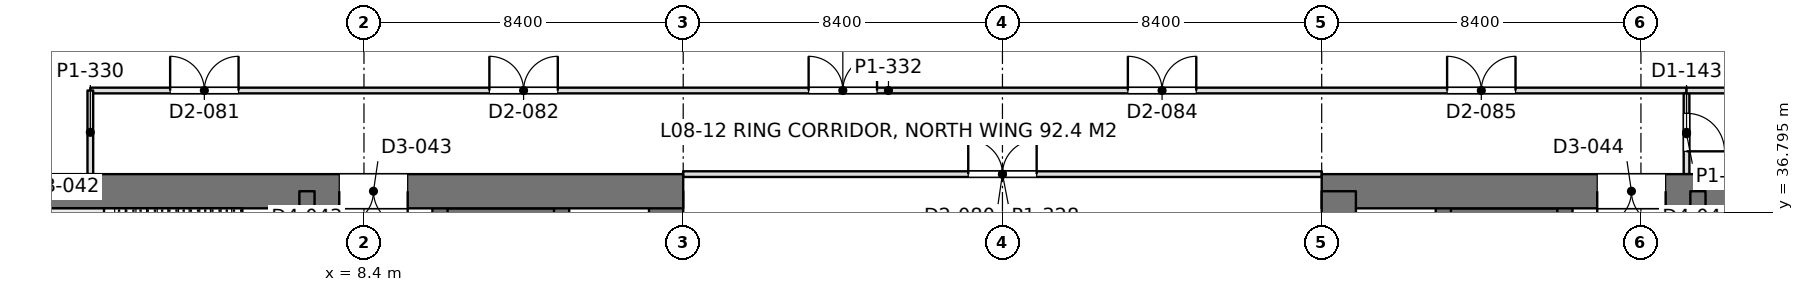
"""IFC4 building model, lengths in metres.
Left out: names, types, materials, properties, quantities, classifications, styles, units other than length and angle.
Written with IfcOpenShell. Run it as: python <this file> out.ifc"""

import sys

from ifc_helpers import new_model, si_unit, direction, frame, frame_2d, origin, place, context, subcontext, project, spatial, rectangle, extrude, element, fill, save


model = new_model("IFC4")
c1 = context("Model", 3, precision=1e-05, world=origin(), true_north=direction((0.0, 1.0)))
c2 = subcontext(c1, "Body", "Model", "MODEL_VIEW")
j1 = project(units=[si_unit("LENGTHUNIT", "METRE"), si_unit("PLANEANGLEUNIT", "RADIAN")], contexts=[c1])
p1 = place(None, origin())
s1 = spatial("IfcSite", under=j1, at=p1, CompositionType="ELEMENT")
p2 = place(p1, origin())
s2 = spatial("IfcBuilding", under=s1, at=p2, CompositionType="ELEMENT")
p3 = place(p2, frame((0.0, 0.0, 36.9)))
s3 = spatial("IfcBuildingStorey", under=s2, at=p3, CompositionType="ELEMENT", Elevation=36.9)
p4 = place(p3, frame((-1.2, 37.35, 0.0), z_axis=(0.0, 0.0, 1.0), x_axis=(1.0, 0.0, 0.0)))
e1 = element("IfcWall", 1, at=p4, inside=s3, PredefinedType="SHEAR", context=c2, shape_type="SweptSolid", body=[
    extrude(rectangle(XDim=18.0, YDim=0.9, at=frame_2d((9.0, 0.0))), origin(), (0.0, 0.0, 1.0), 4.5),
])
p5 = place(p4, frame((8.95, 0.0, 0.0)))
e2 = element("IfcOpeningElement", 2, at=p5, cuts=e1, PredefinedType="OPENING", context=c2, shape_type="SweptSolid", body=[
    extrude(rectangle(XDim=1.8, YDim=2.4, at=frame_2d((0.9, 1.2))), frame((0.0, 0.46, 0.0), z_axis=(0.0, -1.0, 0.0), x_axis=(1.0, 0.0, 0.0)), (0.0, 0.0, 1.0), 0.92),
])
p6 = place(p3, frame((16.35, 13.05, 0.0), z_axis=(0.0, 0.0, 1.0), x_axis=(0.0, 1.0, 0.0)))
e3 = element("IfcWall", 3, at=p6, inside=s3, PredefinedType="SHEAR", context=c2, shape_type="SweptSolid", body=[
    extrude(rectangle(XDim=24.3, YDim=0.9, at=frame_2d((12.15, 0.0))), origin(), (0.0, 0.0, 1.0), 4.5),
])
p7 = place(p3, frame((6.9, 13.05, 0.0), z_axis=(0.0, 0.0, 1.0), x_axis=(0.0, 1.0, 0.0)))
e4 = element("IfcWall", 4, at=p7, inside=s3, PredefinedType="SHEAR", context=c2, shape_type="SweptSolid", body=[
    extrude(rectangle(XDim=24.3, YDim=0.4, at=frame_2d((12.15, 0.0))), origin(), (0.0, 0.0, 1.0), 4.5),
])
p8 = place(p7, frame((1.3, 0.0, 0.0)))
e5 = element("IfcOpeningElement", 5, at=p8, cuts=e4, PredefinedType="OPENING", context=c2, shape_type="SweptSolid", body=[
    extrude(rectangle(XDim=1.0, YDim=2.2, at=frame_2d((0.5, 1.1))), frame((0.0, 0.21, 0.0), z_axis=(0.0, -1.0, 0.0), x_axis=(1.0, 0.0, 0.0)), (0.0, 0.0, 1.0), 0.42),
])
p9 = place(p7, frame((22.0, 0.0, 0.0)))
e6 = element("IfcOpeningElement", 6, at=p9, cuts=e4, PredefinedType="OPENING", context=c2, shape_type="SweptSolid", body=[
    extrude(rectangle(XDim=1.0, YDim=2.2, at=frame_2d((0.5, 1.1))), frame((0.0, 0.21, 0.0), z_axis=(0.0, -1.0, 0.0), x_axis=(1.0, 0.0, 0.0)), (0.0, 0.0, 1.0), 0.42),
])
p10 = place(p7, frame((5.55, 0.0, 0.0)))
e7 = element("IfcOpeningElement", 7, at=p10, cuts=e4, PredefinedType="OPENING", context=c2, shape_type="SweptSolid", body=[
    extrude(rectangle(XDim=1.0, YDim=2.2, at=frame_2d((0.5, 1.1))), frame((0.0, 0.21, 0.0), z_axis=(0.0, -1.0, 0.0), x_axis=(1.0, 0.0, 0.0)), (0.0, 0.0, 1.0), 0.42),
])
p11 = place(p7, frame((9.55, 0.0, 0.0)))
e8 = element("IfcOpeningElement", 8, at=p11, cuts=e4, PredefinedType="OPENING", context=c2, shape_type="SweptSolid", body=[
    extrude(rectangle(XDim=1.0, YDim=2.2, at=frame_2d((0.5, 1.1))), frame((0.0, 0.21, 0.0), z_axis=(0.0, -1.0, 0.0), x_axis=(1.0, 0.0, 0.0)), (0.0, 0.0, 1.0), 0.42),
])
p12 = place(p7, frame((12.8, 0.0, 0.0)))
e9 = element("IfcOpeningElement", 9, at=p12, cuts=e4, PredefinedType="OPENING", context=c2, shape_type="SweptSolid", body=[
    extrude(rectangle(XDim=1.1, YDim=2.2, at=frame_2d((0.55, 1.1))), frame((0.0, 0.21, 0.0), z_axis=(0.0, -1.0, 0.0), x_axis=(1.0, 0.0, 0.0)), (0.0, 0.0, 1.0), 0.42),
])
p13 = place(p7, frame((15.538, 0.0, 0.0)))
e10 = element("IfcOpeningElement", 10, at=p13, cuts=e4, PredefinedType="OPENING", context=c2, shape_type="SweptSolid", body=[
    extrude(rectangle(XDim=1.1, YDim=2.2, at=frame_2d((0.55, 1.1))), frame((0.0, 0.21, 0.0), z_axis=(0.0, -1.0, 0.0), x_axis=(1.0, 0.0, 0.0)), (0.0, 0.0, 1.0), 0.42),
])
p14 = place(p7, frame((18.262, 0.0, 0.0)))
e11 = element("IfcOpeningElement", 11, at=p14, cuts=e4, PredefinedType="OPENING", context=c2, shape_type="SweptSolid", body=[
    extrude(rectangle(XDim=1.1, YDim=2.2, at=frame_2d((0.55, 1.1))), frame((0.0, 0.21, 0.0), z_axis=(0.0, -1.0, 0.0), x_axis=(1.0, 0.0, 0.0)), (0.0, 0.0, 1.0), 0.42),
])
p15 = place(p3, frame((10.4, 13.05, 0.0), z_axis=(0.0, 0.0, 1.0), x_axis=(0.0, 1.0, 0.0)))
e12 = element("IfcWall", 12, at=p15, inside=s3, PredefinedType="SHEAR", context=c2, shape_type="SweptSolid", body=[
    extrude(rectangle(XDim=24.3, YDim=0.4, at=frame_2d((12.15, 0.0))), origin(), (0.0, 0.0, 1.0), 4.5),
])
p16 = place(p15, frame((1.5, 0.0, 0.0)))
e13 = element("IfcOpeningElement", 13, at=p16, cuts=e12, PredefinedType="OPENING", context=c2, shape_type="SweptSolid", body=[
    extrude(rectangle(XDim=1.1, YDim=2.2, at=frame_2d((0.55, 1.1))), frame((0.0, 0.21, 0.0), z_axis=(0.0, -1.0, 0.0), x_axis=(1.0, 0.0, 0.0)), (0.0, 0.0, 1.0), 0.42),
])
p17 = place(p15, frame((4.35, 0.0, 0.0)))
e14 = element("IfcOpeningElement", 14, at=p17, cuts=e12, PredefinedType="OPENING", context=c2, shape_type="SweptSolid", body=[
    extrude(rectangle(XDim=1.1, YDim=2.2, at=frame_2d((0.55, 1.1))), frame((0.0, 0.21, 0.0), z_axis=(0.0, -1.0, 0.0), x_axis=(1.0, 0.0, 0.0)), (0.0, 0.0, 1.0), 0.42),
])
p18 = place(p15, frame((7.2, 0.0, 0.0)))
e15 = element("IfcOpeningElement", 15, at=p18, cuts=e12, PredefinedType="OPENING", context=c2, shape_type="SweptSolid", body=[
    extrude(rectangle(XDim=1.1, YDim=2.2, at=frame_2d((0.55, 1.1))), frame((0.0, 0.21, 0.0), z_axis=(0.0, -1.0, 0.0), x_axis=(1.0, 0.0, 0.0)), (0.0, 0.0, 1.0), 0.42),
])
p19 = place(p15, frame((21.45, 0.0, 0.0)))
e16 = element("IfcOpeningElement", 16, at=p19, cuts=e12, PredefinedType="OPENING", context=c2, shape_type="SweptSolid", body=[
    extrude(rectangle(XDim=1.1, YDim=2.2, at=frame_2d((0.55, 1.1))), frame((0.0, 0.21, 0.0), z_axis=(0.0, -1.0, 0.0), x_axis=(1.0, 0.0, 0.0)), (0.0, 0.0, 1.0), 0.42),
])
p20 = place(p3, frame((13.6, 13.05, 0.0), z_axis=(0.0, 0.0, 1.0), x_axis=(0.0, 1.0, 0.0)))
e17 = element("IfcWall", 17, at=p20, inside=s3, PredefinedType="SHEAR", context=c2, shape_type="SweptSolid", body=[
    extrude(rectangle(XDim=24.3, YDim=0.4, at=frame_2d((12.15, 0.0))), origin(), (0.0, 0.0, 1.0), 4.5),
])
p21 = place(p3, frame((10.4, 36.625, 0.0), z_axis=(0.0, 0.0, 1.0), x_axis=(1.0, 0.0, 0.0)))
e18 = element("IfcWall", 18, at=p21, inside=s3, PredefinedType="SHEAR", context=c2, shape_type="SweptSolid", body=[
    extrude(rectangle(XDim=3.2, YDim=0.55, at=frame_2d((1.6, 0.0))), origin(), (0.0, 0.0, 1.0), 4.5),
])
p22 = place(p3, frame((33.6, 37.35, 0.0), z_axis=(0.0, 0.0, 1.0), x_axis=(1.0, 0.0, 0.0)))
e19 = element("IfcWall", 19, at=p22, inside=s3, PredefinedType="SHEAR", context=c2, shape_type="SweptSolid", body=[
    extrude(rectangle(XDim=18.0, YDim=0.9, at=frame_2d((9.0, 0.0))), origin(), (0.0, 0.0, 1.0), 4.5),
])
p23 = place(p22, frame((7.25, 0.0, 0.0)))
e20 = element("IfcOpeningElement", 20, at=p23, cuts=e19, PredefinedType="OPENING", context=c2, shape_type="SweptSolid", body=[
    extrude(rectangle(XDim=1.8, YDim=2.4, at=frame_2d((0.9, 1.2))), frame((0.0, 0.46, 0.0), z_axis=(0.0, -1.0, 0.0), x_axis=(1.0, 0.0, 0.0)), (0.0, 0.0, 1.0), 0.92),
])
p24 = place(p3, frame((34.05, 13.05, 0.0), z_axis=(0.0, 0.0, 1.0), x_axis=(0.0, 1.0, 0.0)))
e21 = element("IfcWall", 21, at=p24, inside=s3, PredefinedType="SHEAR", context=c2, shape_type="SweptSolid", body=[
    extrude(rectangle(XDim=24.3, YDim=0.9, at=frame_2d((12.15, 0.0))), origin(), (0.0, 0.0, 1.0), 4.5),
])
p25 = place(p3, frame((43.5, 13.05, 0.0), z_axis=(0.0, 0.0, 1.0), x_axis=(0.0, 1.0, 0.0)))
e22 = element("IfcWall", 22, at=p25, inside=s3, PredefinedType="SHEAR", context=c2, shape_type="SweptSolid", body=[
    extrude(rectangle(XDim=24.3, YDim=0.4, at=frame_2d((12.15, 0.0))), origin(), (0.0, 0.0, 1.0), 4.5),
])
p26 = place(p25, frame((1.3, 0.0, 0.0)))
e23 = element("IfcOpeningElement", 23, at=p26, cuts=e22, PredefinedType="OPENING", context=c2, shape_type="SweptSolid", body=[
    extrude(rectangle(XDim=1.0, YDim=2.2, at=frame_2d((0.5, 1.1))), frame((0.0, 0.21, 0.0), z_axis=(0.0, -1.0, 0.0), x_axis=(1.0, 0.0, 0.0)), (0.0, 0.0, 1.0), 0.42),
])
p27 = place(p25, frame((22.0, 0.0, 0.0)))
e24 = element("IfcOpeningElement", 24, at=p27, cuts=e22, PredefinedType="OPENING", context=c2, shape_type="SweptSolid", body=[
    extrude(rectangle(XDim=1.0, YDim=2.2, at=frame_2d((0.5, 1.1))), frame((0.0, 0.21, 0.0), z_axis=(0.0, -1.0, 0.0), x_axis=(1.0, 0.0, 0.0)), (0.0, 0.0, 1.0), 0.42),
])
p28 = place(p25, frame((5.55, 0.0, 0.0)))
e25 = element("IfcOpeningElement", 25, at=p28, cuts=e22, PredefinedType="OPENING", context=c2, shape_type="SweptSolid", body=[
    extrude(rectangle(XDim=1.0, YDim=2.2, at=frame_2d((0.5, 1.1))), frame((0.0, 0.21, 0.0), z_axis=(0.0, -1.0, 0.0), x_axis=(1.0, 0.0, 0.0)), (0.0, 0.0, 1.0), 0.42),
])
p29 = place(p25, frame((9.55, 0.0, 0.0)))
e26 = element("IfcOpeningElement", 26, at=p29, cuts=e22, PredefinedType="OPENING", context=c2, shape_type="SweptSolid", body=[
    extrude(rectangle(XDim=1.0, YDim=2.2, at=frame_2d((0.5, 1.1))), frame((0.0, 0.21, 0.0), z_axis=(0.0, -1.0, 0.0), x_axis=(1.0, 0.0, 0.0)), (0.0, 0.0, 1.0), 0.42),
])
p30 = place(p25, frame((12.8, 0.0, 0.0)))
e27 = element("IfcOpeningElement", 27, at=p30, cuts=e22, PredefinedType="OPENING", context=c2, shape_type="SweptSolid", body=[
    extrude(rectangle(XDim=1.1, YDim=2.2, at=frame_2d((0.55, 1.1))), frame((0.0, 0.21, 0.0), z_axis=(0.0, -1.0, 0.0), x_axis=(1.0, 0.0, 0.0)), (0.0, 0.0, 1.0), 0.42),
])
p31 = place(p25, frame((15.538, 0.0, 0.0)))
e28 = element("IfcOpeningElement", 28, at=p31, cuts=e22, PredefinedType="OPENING", context=c2, shape_type="SweptSolid", body=[
    extrude(rectangle(XDim=1.1, YDim=2.2, at=frame_2d((0.55, 1.1))), frame((0.0, 0.21, 0.0), z_axis=(0.0, -1.0, 0.0), x_axis=(1.0, 0.0, 0.0)), (0.0, 0.0, 1.0), 0.42),
])
p32 = place(p25, frame((18.262, 0.0, 0.0)))
e29 = element("IfcOpeningElement", 29, at=p32, cuts=e22, PredefinedType="OPENING", context=c2, shape_type="SweptSolid", body=[
    extrude(rectangle(XDim=1.1, YDim=2.2, at=frame_2d((0.55, 1.1))), frame((0.0, 0.21, 0.0), z_axis=(0.0, -1.0, 0.0), x_axis=(1.0, 0.0, 0.0)), (0.0, 0.0, 1.0), 0.42),
])
p33 = place(p3, frame((40.0, 13.05, 0.0), z_axis=(0.0, 0.0, 1.0), x_axis=(0.0, 1.0, 0.0)))
e30 = element("IfcWall", 30, at=p33, inside=s3, PredefinedType="SHEAR", context=c2, shape_type="SweptSolid", body=[
    extrude(rectangle(XDim=24.3, YDim=0.4, at=frame_2d((12.15, 0.0))), origin(), (0.0, 0.0, 1.0), 4.5),
])
p34 = place(p33, frame((1.5, 0.0, 0.0)))
e31 = element("IfcOpeningElement", 31, at=p34, cuts=e30, PredefinedType="OPENING", context=c2, shape_type="SweptSolid", body=[
    extrude(rectangle(XDim=1.1, YDim=2.2, at=frame_2d((0.55, 1.1))), frame((0.0, 0.21, 0.0), z_axis=(0.0, -1.0, 0.0), x_axis=(1.0, 0.0, 0.0)), (0.0, 0.0, 1.0), 0.42),
])
p35 = place(p33, frame((4.35, 0.0, 0.0)))
e32 = element("IfcOpeningElement", 32, at=p35, cuts=e30, PredefinedType="OPENING", context=c2, shape_type="SweptSolid", body=[
    extrude(rectangle(XDim=1.1, YDim=2.2, at=frame_2d((0.55, 1.1))), frame((0.0, 0.21, 0.0), z_axis=(0.0, -1.0, 0.0), x_axis=(1.0, 0.0, 0.0)), (0.0, 0.0, 1.0), 0.42),
])
p36 = place(p33, frame((7.2, 0.0, 0.0)))
e33 = element("IfcOpeningElement", 33, at=p36, cuts=e30, PredefinedType="OPENING", context=c2, shape_type="SweptSolid", body=[
    extrude(rectangle(XDim=1.1, YDim=2.2, at=frame_2d((0.55, 1.1))), frame((0.0, 0.21, 0.0), z_axis=(0.0, -1.0, 0.0), x_axis=(1.0, 0.0, 0.0)), (0.0, 0.0, 1.0), 0.42),
])
p37 = place(p33, frame((21.45, 0.0, 0.0)))
e34 = element("IfcOpeningElement", 34, at=p37, cuts=e30, PredefinedType="OPENING", context=c2, shape_type="SweptSolid", body=[
    extrude(rectangle(XDim=1.1, YDim=2.2, at=frame_2d((0.55, 1.1))), frame((0.0, 0.21, 0.0), z_axis=(0.0, -1.0, 0.0), x_axis=(1.0, 0.0, 0.0)), (0.0, 0.0, 1.0), 0.42),
])
p38 = place(p3, frame((36.8, 13.05, 0.0), z_axis=(0.0, 0.0, 1.0), x_axis=(0.0, 1.0, 0.0)))
e35 = element("IfcWall", 35, at=p38, inside=s3, PredefinedType="SHEAR", context=c2, shape_type="SweptSolid", body=[
    extrude(rectangle(XDim=24.3, YDim=0.4, at=frame_2d((12.15, 0.0))), origin(), (0.0, 0.0, 1.0), 4.5),
])
p39 = place(p3, frame((40.0, 36.625, 0.0), z_axis=(0.0, 0.0, 1.0), x_axis=(-1.0, 0.0, 0.0)))
e36 = element("IfcWall", 36, at=p39, inside=s3, PredefinedType="SHEAR", context=c2, shape_type="SweptSolid", body=[
    extrude(rectangle(XDim=3.2, YDim=0.55, at=frame_2d((1.6, 0.0))), origin(), (0.0, 0.0, 1.0), 4.5),
])
p40 = place(p3, frame((1.2, 40.0, 0.0), z_axis=(0.0, 0.0, 1.0), x_axis=(1.0, 0.0, 0.0)))
e37 = element("IfcWall", 37, at=p40, inside=s3, PredefinedType="PARTITIONING", context=c2, shape_type="SweptSolid", body=[
    extrude(rectangle(XDim=42.002, YDim=0.15, at=frame_2d((21.001, 0.0))), origin(), (0.0, 0.0, 1.0), 3.74),
])
p41 = place(p40, frame((2.1, 0.0, 0.0)))
e38 = element("IfcOpeningElement", 38, at=p41, cuts=e37, PredefinedType="OPENING", context=c2, shape_type="SweptSolid", body=[
    extrude(rectangle(XDim=1.8, YDim=2.2, at=frame_2d((0.9, 1.1))), frame((0.0, 0.085, 0.0), z_axis=(0.0, -1.0, 0.0), x_axis=(1.0, 0.0, 0.0)), (0.0, 0.0, 1.0), 0.17),
])
p42 = place(p40, frame((10.5, 0.0, 0.0)))
e39 = element("IfcOpeningElement", 39, at=p42, cuts=e37, PredefinedType="OPENING", context=c2, shape_type="SweptSolid", body=[
    extrude(rectangle(XDim=1.8, YDim=2.2, at=frame_2d((0.9, 1.1))), frame((0.0, 0.085, 0.0), z_axis=(0.0, -1.0, 0.0), x_axis=(1.0, 0.0, 0.0)), (0.0, 0.0, 1.0), 0.17),
])
p43 = place(p40, frame((18.9, 0.0, 0.0)))
e40 = element("IfcOpeningElement", 40, at=p43, cuts=e37, PredefinedType="OPENING", context=c2, shape_type="SweptSolid", body=[
    extrude(rectangle(XDim=1.8, YDim=2.2, at=frame_2d((0.9, 1.1))), frame((0.0, 0.085, 0.0), z_axis=(0.0, -1.0, 0.0), x_axis=(1.0, 0.0, 0.0)), (0.0, 0.0, 1.0), 0.17),
])
p44 = place(p40, frame((27.3, 0.0, 0.0)))
e41 = element("IfcOpeningElement", 41, at=p44, cuts=e37, PredefinedType="OPENING", context=c2, shape_type="SweptSolid", body=[
    extrude(rectangle(XDim=1.8, YDim=2.2, at=frame_2d((0.9, 1.1))), frame((0.0, 0.085, 0.0), z_axis=(0.0, -1.0, 0.0), x_axis=(1.0, 0.0, 0.0)), (0.0, 0.0, 1.0), 0.17),
])
p45 = place(p40, frame((35.7, 0.0, 0.0)))
e42 = element("IfcOpeningElement", 42, at=p45, cuts=e37, PredefinedType="OPENING", context=c2, shape_type="SweptSolid", body=[
    extrude(rectangle(XDim=1.8, YDim=2.2, at=frame_2d((0.9, 1.1))), frame((0.0, 0.085, 0.0), z_axis=(0.0, -1.0, 0.0), x_axis=(1.0, 0.0, 0.0)), (0.0, 0.0, 1.0), 0.17),
])
p46 = place(p3, frame((1.2, 37.8, 0.0), z_axis=(0.0, 0.0, 1.0), x_axis=(0.0, 1.0, 0.0)))
e43 = element("IfcWall", 43, at=p46, inside=s3, PredefinedType="PARTITIONING", context=c2, shape_type="SweptSolid", body=[
    extrude(rectangle(XDim=2.2, YDim=0.15, at=frame_2d((1.1, 0.0))), origin(), (0.0, 0.0, 1.0), 4.34),
])
p47 = place(p3, frame((43.2, 37.8, 0.0), z_axis=(0.0, 0.0, 1.0), x_axis=(0.0, 1.0, 0.0)))
e44 = element("IfcWall", 44, at=p47, inside=s3, PredefinedType="PARTITIONING", context=c2, shape_type="SweptSolid", body=[
    extrude(rectangle(XDim=2.126, YDim=0.15, at=frame_2d((1.063, 0.0))), origin(), (0.0, 0.0, 1.0), 4.34),
])
p48 = place(p47, frame((0.6, 0.0, 0.0)))
e45 = element("IfcOpeningElement", 45, at=p48, cuts=e44, PredefinedType="OPENING", context=c2, shape_type="SweptSolid", body=[
    extrude(rectangle(XDim=1.0, YDim=2.2, at=frame_2d((0.5, 1.1))), frame((0.0, 0.085, 0.0), z_axis=(0.0, -1.0, 0.0), x_axis=(1.0, 0.0, 0.0)), (0.0, 0.0, 1.0), 0.17),
])
p49 = place(p3, frame((43.198, 40.0, 0.0), z_axis=(0.0, 0.0, 1.0), x_axis=(1.0, 0.0, 0.0)))
e46 = element("IfcWall", 46, at=p49, inside=s3, PredefinedType="PARTITIONING", context=c2, shape_type="SweptSolid", body=[
    extrude(rectangle(XDim=6.002, YDim=0.15, at=frame_2d((3.001, 0.0))), origin(), (0.0, 0.0, 1.0), 3.98),
])
p50 = place(p3, frame((16.798, 37.8, 0.0), z_axis=(0.0, 0.0, 1.0), x_axis=(1.0, 0.0, 0.0)))
e47 = element("IfcWall", 47, at=p50, inside=s3, PredefinedType="PARTITIONING", context=c2, shape_type="SweptSolid", body=[
    extrude(rectangle(XDim=16.804, YDim=0.15, at=frame_2d((8.402, 0.0))), origin(), (0.0, 0.0, 1.0), 3.74),
])
p51 = place(p50, frame((7.502, 0.0, 0.0)))
e48 = element("IfcOpeningElement", 48, at=p51, cuts=e47, PredefinedType="OPENING", context=c2, shape_type="SweptSolid", body=[
    extrude(rectangle(XDim=1.8, YDim=2.2, at=frame_2d((0.9, 1.1))), frame((0.0, 0.085, 0.0), z_axis=(0.0, -1.0, 0.0), x_axis=(1.0, 0.0, 0.0)), (0.0, 0.0, 1.0), 0.17),
])
p52 = place(p5, frame((1.8, 0.0, 0.0), z_axis=(0.0, 0.0, 1.0), x_axis=(-1.0, 0.0, 0.0)))
e49 = element("IfcDoor", 49, at=p52, inside=s3, OperationType="DOUBLE_DOOR_SINGLE_SWING", PredefinedType="DOOR", context=c2, shape_type="SweptSolid", body=[
    extrude(rectangle(XDim=1.8, YDim=2.4, at=frame_2d((0.9, 1.2))), frame((0.0, 0.025, 0.0), z_axis=(0.0, -1.0, 0.0), x_axis=(1.0, 0.0, 0.0)), (0.0, 0.0, 1.0), 0.05),
])
fill(e2, e49)
p53 = place(p23, frame((1.8, 0.0, 0.0), z_axis=(0.0, 0.0, 1.0), x_axis=(-1.0, 0.0, 0.0)))
e50 = element("IfcDoor", 50, at=p53, inside=s3, OperationType="DOUBLE_DOOR_SINGLE_SWING", PredefinedType="DOOR", context=c2, shape_type="SweptSolid", body=[
    extrude(rectangle(XDim=1.8, YDim=2.4, at=frame_2d((0.9, 1.2))), frame((0.0, 0.025, 0.0), z_axis=(0.0, -1.0, 0.0), x_axis=(1.0, 0.0, 0.0)), (0.0, 0.0, 1.0), 0.05),
])
fill(e20, e50)
p54 = place(p41, origin())
e51 = element("IfcDoor", 51, at=p54, inside=s3, OperationType="DOUBLE_DOOR_SINGLE_SWING", PredefinedType="DOOR", context=c2, shape_type="SweptSolid", body=[
    extrude(rectangle(XDim=1.8, YDim=2.2, at=frame_2d((0.9, 1.1))), frame((0.0, 0.025, 0.0), z_axis=(0.0, -1.0, 0.0), x_axis=(1.0, 0.0, 0.0)), (0.0, 0.0, 1.0), 0.05),
])
fill(e38, e51)
p55 = place(p42, origin())
e52 = element("IfcDoor", 52, at=p55, inside=s3, OperationType="DOUBLE_DOOR_SINGLE_SWING", PredefinedType="DOOR", context=c2, shape_type="SweptSolid", body=[
    extrude(rectangle(XDim=1.8, YDim=2.2, at=frame_2d((0.9, 1.1))), frame((0.0, 0.025, 0.0), z_axis=(0.0, -1.0, 0.0), x_axis=(1.0, 0.0, 0.0)), (0.0, 0.0, 1.0), 0.05),
])
fill(e39, e52)
p56 = place(p43, origin())
e53 = element("IfcDoor", 53, at=p56, inside=s3, OperationType="DOUBLE_DOOR_SINGLE_SWING", PredefinedType="DOOR", context=c2, shape_type="SweptSolid", body=[
    extrude(rectangle(XDim=1.8, YDim=2.2, at=frame_2d((0.9, 1.1))), frame((0.0, 0.025, 0.0), z_axis=(0.0, -1.0, 0.0), x_axis=(1.0, 0.0, 0.0)), (0.0, 0.0, 1.0), 0.05),
])
fill(e40, e53)
p57 = place(p44, origin())
e54 = element("IfcDoor", 54, at=p57, inside=s3, OperationType="DOUBLE_DOOR_SINGLE_SWING", PredefinedType="DOOR", context=c2, shape_type="SweptSolid", body=[
    extrude(rectangle(XDim=1.8, YDim=2.2, at=frame_2d((0.9, 1.1))), frame((0.0, 0.025, 0.0), z_axis=(0.0, -1.0, 0.0), x_axis=(1.0, 0.0, 0.0)), (0.0, 0.0, 1.0), 0.05),
])
fill(e41, e54)
p58 = place(p45, origin())
e55 = element("IfcDoor", 55, at=p58, inside=s3, OperationType="DOUBLE_DOOR_SINGLE_SWING", PredefinedType="DOOR", context=c2, shape_type="SweptSolid", body=[
    extrude(rectangle(XDim=1.8, YDim=2.2, at=frame_2d((0.9, 1.1))), frame((0.0, 0.025, 0.0), z_axis=(0.0, -1.0, 0.0), x_axis=(1.0, 0.0, 0.0)), (0.0, 0.0, 1.0), 0.05),
])
fill(e42, e55)
p59 = place(p48, frame((1.0, 0.0, 0.0), z_axis=(0.0, 0.0, 1.0), x_axis=(-1.0, 0.0, 0.0)))
e56 = element("IfcDoor", 56, at=p59, inside=s3, OperationType="SINGLE_SWING_RIGHT", PredefinedType="DOOR", context=c2, shape_type="SweptSolid", body=[
    extrude(rectangle(XDim=1.0, YDim=2.2, at=frame_2d((0.5, 1.1))), frame((0.0, 0.025, 0.0), z_axis=(0.0, -1.0, 0.0), x_axis=(1.0, 0.0, 0.0)), (0.0, 0.0, 1.0), 0.05),
])
fill(e45, e56)
p60 = place(p51, origin())
e57 = element("IfcDoor", 57, at=p60, inside=s3, OperationType="DOUBLE_DOOR_SINGLE_SWING", PredefinedType="DOOR", context=c2, shape_type="SweptSolid", body=[
    extrude(rectangle(XDim=1.8, YDim=2.2, at=frame_2d((0.9, 1.1))), frame((0.0, 0.025, 0.0), z_axis=(0.0, -1.0, 0.0), x_axis=(1.0, 0.0, 0.0)), (0.0, 0.0, 1.0), 0.05),
])
fill(e48, e57)
save(model, sys.argv[1])
